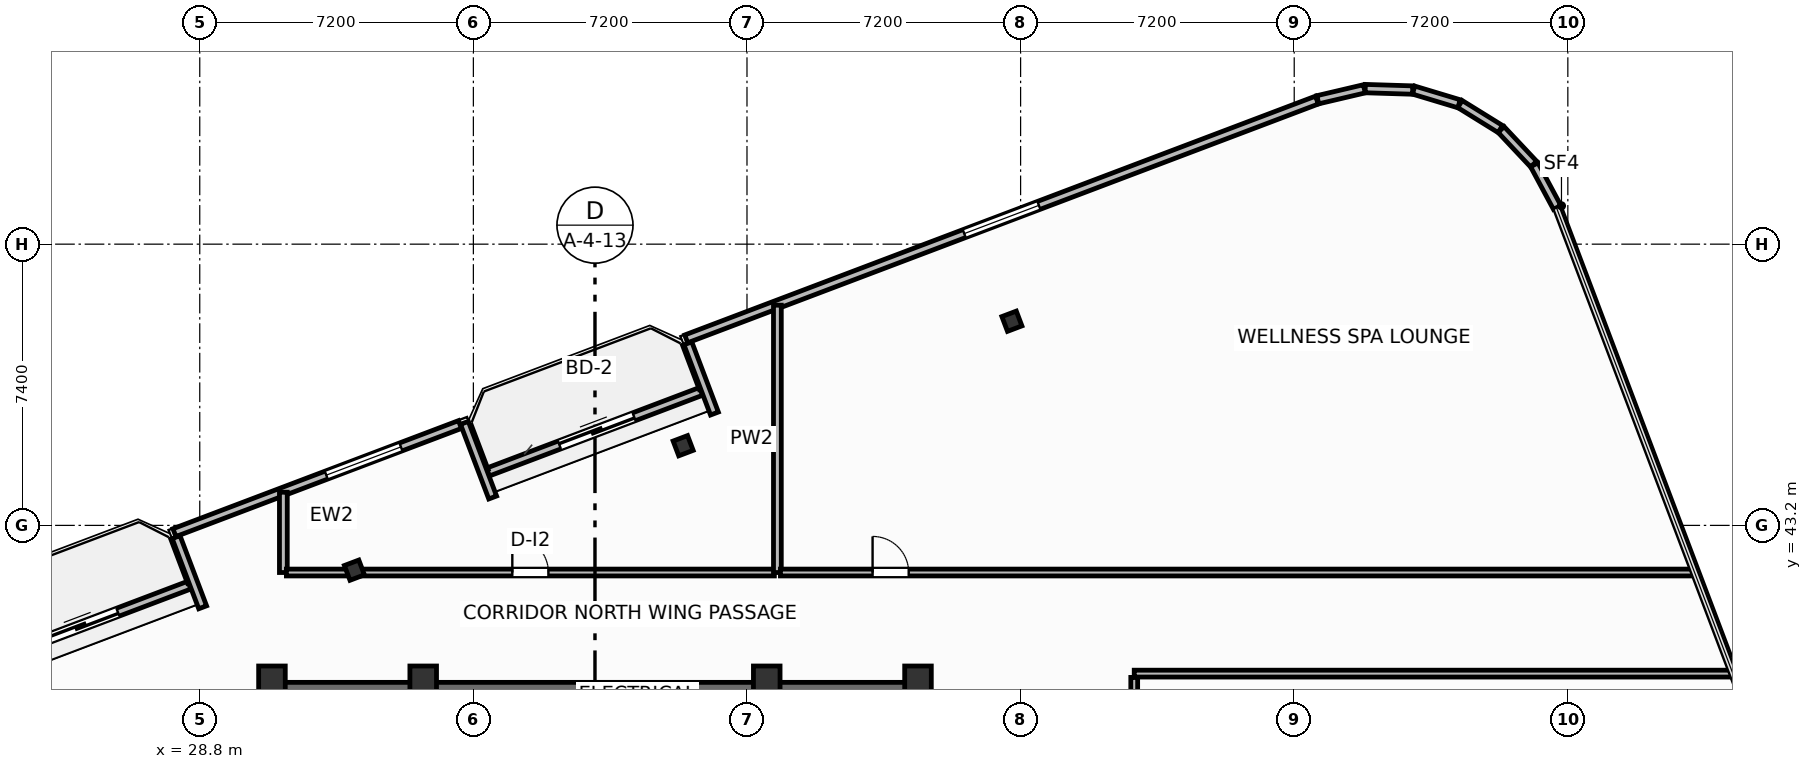
"""IFC4 building model, lengths in metres.
Left out: names, types, materials, properties, quantities, classifications, styles, units other than length and angle.
Written with IfcOpenShell. Run it as: python <this file> out.ifc"""

import sys

from ifc_helpers import new_model, si_unit, direction, frame, frame_2d, origin, origin_2d, place, context, subcontext, project, spatial, rectangle, i_section, extrude, element, fill, save


model = new_model("IFC4")
c1 = context("Model", 3, precision=1e-05, world=origin(), true_north=direction((0.0, 1.0)))
c2 = subcontext(c1, "Body", "Model", "MODEL_VIEW")
j1 = project(units=[si_unit("LENGTHUNIT", "METRE"), si_unit("PLANEANGLEUNIT", "RADIAN")], contexts=[c1])
p1 = place(None, origin())
s1 = spatial("IfcSite", under=j1, at=p1, CompositionType="ELEMENT")
p2 = place(p1, origin())
s2 = spatial("IfcBuilding", under=s1, at=p2, CompositionType="ELEMENT")
p3 = place(p2, frame((0.0, 0.0, 249.7)))
s3 = spatial("IfcBuildingStorey", under=s2, at=p3, CompositionType="ELEMENT", Elevation=249.7)
for number, where, z_axis, x_axis in (
    (1, (30.7, 39.05, 0.0), (0.0, 0.0, 1.0), (1.0, 0.0, 0.0)),
    (2, (34.68, 39.05, 0.0), (0.0, 0.0, 1.0), (1.0, 0.0, 0.0)),
    (3, (43.72, 39.05, 0.0), (0.0, 0.0, 1.0), (1.0, 0.0, 0.0)),
    (4, (47.7, 39.05, 0.0), (0.0, 0.0, 1.0), (1.0, 0.0, 0.0)),
):
    element("IfcColumn", number, at=place(p3, frame(where, z_axis=z_axis, x_axis=x_axis)), inside=s3, PredefinedType="COLUMN", context=c2, shape_type="SweptSolid", body=[
        extrude(rectangle(XDim=0.7, YDim=0.9, at=origin_2d()), origin(), (0.0, 0.0, 1.0), 3.7),
    ])
p4 = place(p3, frame((30.48, 38.745, 0.0), z_axis=(0.0, 0.0, 1.0), x_axis=(1.0, 0.0, 0.0)))
e5 = element("IfcWall", 5, at=p4, inside=s3, PredefinedType="SHEAR", context=c2, shape_type="SweptSolid", body=[
    extrude(rectangle(XDim=17.44, YDim=0.65, at=frame_2d((8.72, 0.0))), origin(), (0.0, 0.0, 1.0), 3.38),
])
for number, where, z_axis, x_axis in (
    (6, (50.171, 48.572, 0.0), (0.0, 0.0, 1.0), (0.935, 0.354, 0.0)),
    (7, (41.52, 45.297, 0.0), (0.0, 0.0, 1.0), (0.935, 0.354, 0.0)),
    (8, (32.869, 42.022, 0.0), (0.0, 0.0, 1.0), (0.935, 0.354, 0.0)),
):
    element("IfcColumn", number, at=place(p3, frame(where, z_axis=z_axis, x_axis=x_axis)), inside=s3, PredefinedType="COLUMN", context=c2, shape_type="SweptSolid", body=[
        extrude(i_section(OverallWidth=0.406, OverallDepth=0.416, WebThickness=0.03, FlangeThickness=0.048, FilletRadius=0.025, at=origin_2d()), origin(), (0.0, 0.0, 1.0), 3.7),
    ])
p5 = place(p3, frame((22.916, 39.504, 0.0), z_axis=(0.0, 0.0, 1.0), x_axis=(0.93521416643, 0.354082565101, 0.0)))
e9 = element("IfcWall", 9, at=p5, inside=s3, PredefinedType="SOLIDWALL", context=c2, shape_type="SweptSolid", body=[
    extrude(rectangle(XDim=6.0, YDim=0.22, at=frame_2d((3.0, 0.0))), origin(), (0.0, 0.0, 1.0), 2.66),
])
p6 = place(p5, frame((1.888, 0.0, 0.0)))
e10 = element("IfcOpeningElement", 10, at=p6, cuts=e9, PredefinedType="OPENING", context=c2, shape_type="SweptSolid", body=[
    extrude(rectangle(XDim=2.1, YDim=2.3, at=frame_2d((1.05, 1.15))), frame((0.0, 0.12, 0.0), z_axis=(0.0, -1.0, 0.0), x_axis=(1.0, 0.0, 0.0)), (0.0, 0.0, 1.0), 0.24),
])
p7 = place(p3, frame((36.383, 44.603, 0.0), z_axis=(0.0, 0.0, 1.0), x_axis=(0.935227640088, 0.354046976001, 0.0)))
e11 = element("IfcWall", 11, at=p7, inside=s3, PredefinedType="SOLIDWALL", context=c2, shape_type="SweptSolid", body=[
    extrude(rectangle(XDim=6.0, YDim=0.22, at=frame_2d((3.0, 0.0))), origin(), (0.0, 0.0, 1.0), 2.66),
])
p8 = place(p7, frame((2.012, 0.0, 0.0)))
e12 = element("IfcOpeningElement", 12, at=p8, cuts=e11, PredefinedType="OPENING", context=c2, shape_type="SweptSolid", body=[
    extrude(rectangle(XDim=2.1, YDim=2.3, at=frame_2d((1.05, 1.15))), frame((0.0, 0.12, 0.0), z_axis=(0.0, -1.0, 0.0), x_axis=(1.0, 0.0, 0.0)), (0.0, 0.0, 1.0), 0.24),
])
p9 = place(p3, frame((64.519, 51.566, 0.0), z_axis=(0.0, 0.0, 1.0), x_axis=(-0.473093575122, 0.881012184466, 0.0)))
e13 = element("IfcWall", 13, at=p9, inside=s3, PredefinedType="SOLIDWALL", context=c2, shape_type="SweptSolid", body=[
    extrude(rectangle(XDim=1.274, YDim=0.22, at=frame_2d((0.637, 0.0))), origin(), (0.0, 0.0, 1.0), 2.66),
])
for number, where, z_axis, x_axis in (
    (14, (63.899, 52.706, 0.0), (0.0, 0.0, 1.0), (-0.685, 0.729, 0.0)),
    (15, (63.023, 53.629, 0.0), (0.0, 0.0, 1.0), (-0.85, 0.526, 0.0)),
):
    element("IfcWall", number, at=place(p3, frame(where, z_axis=z_axis, x_axis=x_axis)), inside=s3, PredefinedType="SOLIDWALL", context=c2, shape_type="SweptSolid", body=[
        extrude(rectangle(XDim=1.249, YDim=0.22, at=frame_2d((0.625, 0.0))), origin(), (0.0, 0.0, 1.0), 2.66),
    ])
for number, where, z_axis, x_axis in (
    (16, (61.937, 54.294, 0.0), (0.0, 0.0, 1.0), (-0.958, 0.288, 0.0)),
    (17, (60.717, 54.655, 0.0), (0.0, 0.0, 1.0), (-1.0, 0.031, 0.0)),
):
    element("IfcWall", number, at=place(p3, frame(where, z_axis=z_axis, x_axis=x_axis)), inside=s3, PredefinedType="SOLIDWALL", context=c2, shape_type="SweptSolid", body=[
        extrude(rectangle(XDim=1.249, YDim=0.22, at=frame_2d((0.624, 0.0))), origin(), (0.0, 0.0, 1.0), 2.66),
    ])
p10 = place(p3, frame((59.444, 54.688, 0.0), z_axis=(0.0, 0.0, 1.0), x_axis=(-0.973409523464, -0.229071821989, 0.0)))
e18 = element("IfcWall", 18, at=p10, inside=s3, PredefinedType="SOLIDWALL", context=c2, shape_type="SweptSolid", body=[
    extrude(rectangle(XDim=1.257, YDim=0.22, at=frame_2d((0.628, 0.0))), origin(), (0.0, 0.0, 1.0), 2.66),
])
p11 = place(p3, frame((58.198, 54.391, 0.0), z_axis=(0.0, 0.0, 1.0), x_axis=(-0.935223849772, -0.354056988094, 0.0)))
e19 = element("IfcWall", 19, at=p11, inside=s3, PredefinedType="SOLIDWALL", context=c2, shape_type="SweptSolid", body=[
    extrude(rectangle(XDim=17.747, YDim=0.22, at=frame_2d((8.874, 0.0))), origin(), (0.0, 0.0, 1.0), 2.66),
])
p12 = place(p11, frame((7.823, 0.0, 0.8)))
e20 = element("IfcOpeningElement", 20, at=p12, cuts=e19, PredefinedType="OPENING", context=c2, shape_type="SweptSolid", body=[
    extrude(rectangle(XDim=2.1, YDim=1.75, at=frame_2d((1.05, 0.875))), frame((0.0, 0.12, 0.0), z_axis=(0.0, -1.0, 0.0), x_axis=(1.0, 0.0, 0.0)), (0.0, 0.0, 1.0), 0.24),
])
p13 = place(p3, frame((41.645, 47.99, 0.0), z_axis=(0.0, 0.0, 1.0), x_axis=(0.354020680661, -0.935237594232, 0.0)))
e21 = element("IfcWall", 21, at=p13, inside=s3, PredefinedType="SOLIDWALL", context=c2, shape_type="SweptSolid", body=[
    extrude(rectangle(XDim=1.975, YDim=0.22, at=frame_2d((0.988, 0.0))), origin(), (0.0, 0.0, 1.0), 2.66),
])
p14 = place(p3, frame((36.508, 43.934, 0.0), z_axis=(0.0, 0.0, 1.0), x_axis=(-0.354128469405, 0.935196785258, 0.0)))
e22 = element("IfcWall", 22, at=p14, inside=s3, PredefinedType="SOLIDWALL", context=c2, shape_type="SweptSolid", body=[
    extrude(rectangle(XDim=2.1, YDim=0.22, at=frame_2d((1.05, 0.0))), origin(), (0.0, 0.0, 1.0), 2.66),
])
p15 = place(p3, frame((35.648, 45.854, 0.0), z_axis=(0.0, 0.0, 1.0), x_axis=(-0.935230796934, -0.354038636968, 0.0)))
e23 = element("IfcWall", 23, at=p15, inside=s3, PredefinedType="SOLIDWALL", context=c2, shape_type="SweptSolid", body=[
    extrude(rectangle(XDim=8.035, YDim=0.22, at=frame_2d((4.018, 0.0))), origin(), (0.0, 0.0, 1.0), 2.66),
])
p16 = place(p15, frame((1.662, 0.0, 0.8)))
e24 = element("IfcOpeningElement", 24, at=p16, cuts=e23, PredefinedType="OPENING", context=c2, shape_type="SweptSolid", body=[
    extrude(rectangle(XDim=2.1, YDim=1.75, at=frame_2d((1.05, 0.875))), frame((0.0, 0.12, 0.0), z_axis=(0.0, -1.0, 0.0), x_axis=(1.0, 0.0, 0.0)), (0.0, 0.0, 1.0), 0.24),
])
p17 = place(p3, frame((28.177, 42.892, 0.0), z_axis=(0.0, 0.0, 1.0), x_axis=(0.354061611705, -0.935222099352, 0.0)))
e25 = element("IfcWall", 25, at=p17, inside=s3, PredefinedType="SOLIDWALL", context=c2, shape_type="SweptSolid", body=[
    extrude(rectangle(XDim=1.975, YDim=0.22, at=frame_2d((0.987, 0.0))), origin(), (0.0, 0.0, 1.0), 2.66),
])
p18 = place(p3, frame((31.0, 41.96, 0.0), z_axis=(0.0, 0.0, 1.0), x_axis=(0.0, 1.0, 0.0)))
e26 = element("IfcWall", 26, at=p18, inside=s3, PredefinedType="PARTITIONING", context=c2, shape_type="SweptSolid", body=[
    extrude(rectangle(XDim=2.113, YDim=0.205, at=frame_2d((1.056, 0.0))), origin(), (0.0, 0.0, 1.0), 3.38),
])
p19 = place(p3, frame((31.08, 41.96, 0.0), z_axis=(0.0, 0.0, 1.0), x_axis=(1.0, 0.0, 0.0)))
e27 = element("IfcWall", 27, at=p19, inside=s3, PredefinedType="PARTITIONING", context=c2, shape_type="SweptSolid", body=[
    extrude(rectangle(XDim=12.84, YDim=0.18, at=frame_2d((6.42, 0.0))), origin(), (0.0, 0.0, 1.0), 3.38),
])
p20 = place(p19, frame((5.945, 0.0, 0.0)))
e28 = element("IfcOpeningElement", 28, at=p20, cuts=e27, PredefinedType="OPENING", context=c2, shape_type="SweptSolid", body=[
    extrude(rectangle(XDim=0.95, YDim=2.05, at=frame_2d((0.475, 1.025))), frame((0.0, 0.1, 0.0), z_axis=(0.0, -1.0, 0.0), x_axis=(1.0, 0.0, 0.0)), (0.0, 0.0, 1.0), 0.2),
])
p21 = place(p3, frame((44.0, 41.96, 0.0), z_axis=(0.0, 0.0, 1.0), x_axis=(0.0, 1.0, 0.0)))
e29 = element("IfcWall", 29, at=p21, inside=s3, PredefinedType="PARTITIONING", context=c2, shape_type="SweptSolid", body=[
    extrude(rectangle(XDim=7.034, YDim=0.205, at=frame_2d((3.517, 0.0))), origin(), (0.0, 0.0, 1.0), 3.38),
])
p22 = place(p3, frame((44.08, 41.96, 0.0), z_axis=(0.0, 0.0, 1.0), x_axis=(1.0, 0.0, 0.0)))
e30 = element("IfcWall", 30, at=p22, inside=s3, PredefinedType="PARTITIONING", context=c2, shape_type="SweptSolid", body=[
    extrude(rectangle(XDim=24.016, YDim=0.18, at=frame_2d((12.008, 0.0))), origin(), (0.0, 0.0, 1.0), 3.38),
])
p23 = place(p22, frame((2.425, 0.0, 0.0)))
e31 = element("IfcOpeningElement", 31, at=p23, cuts=e30, PredefinedType="OPENING", context=c2, shape_type="SweptSolid", body=[
    extrude(rectangle(XDim=0.95, YDim=2.05, at=frame_2d((0.475, 1.025))), frame((0.0, 0.1, 0.0), z_axis=(0.0, -1.0, 0.0), x_axis=(1.0, 0.0, 0.0)), (0.0, 0.0, 1.0), 0.2),
])
p24 = place(p3, frame((53.39, 27.53, 0.0), z_axis=(0.0, 0.0, 1.0), x_axis=(0.0, 1.0, 0.0)))
e32 = element("IfcWall", 32, at=p24, inside=s3, PredefinedType="PARTITIONING", context=c2, shape_type="SweptSolid", body=[
    extrude(rectangle(XDim=11.67, YDim=0.18, at=frame_2d((5.835, 0.0))), origin(), (0.0, 0.0, 1.0), 3.38),
])
p25 = place(p24, frame((5.8, 0.0, 0.0)))
e33 = element("IfcOpeningElement", 33, at=p25, cuts=e32, PredefinedType="OPENING", context=c2, shape_type="SweptSolid", body=[
    extrude(rectangle(XDim=0.92, YDim=2.05, at=frame_2d((0.46, 1.025))), frame((0.0, 0.1, 0.0), z_axis=(0.0, -1.0, 0.0), x_axis=(1.0, 0.0, 0.0)), (0.0, 0.0, 1.0), 0.2),
])
p26 = place(p3, frame((53.39, 39.3, 0.0), z_axis=(0.0, 0.0, 1.0), x_axis=(1.0, 0.0, 0.0)))
e34 = element("IfcWall", 34, at=p26, inside=s3, PredefinedType="PARTITIONING", context=c2, shape_type="SweptSolid", body=[
    extrude(rectangle(XDim=15.713, YDim=0.18, at=frame_2d((7.856, 0.0))), origin(), (0.0, 0.0, 1.0), 3.38),
])
p27 = place(p6, origin())
e35 = element("IfcDoor", 35, at=p27, inside=s3, OperationType="SLIDING_TO_LEFT", PredefinedType="DOOR", context=c2, shape_type="SweptSolid", body=[
    extrude(rectangle(XDim=2.1, YDim=2.3, at=frame_2d((1.05, 1.15))), frame((0.0, 0.025, 0.0), z_axis=(0.0, -1.0, 0.0), x_axis=(1.0, 0.0, 0.0)), (0.0, 0.0, 1.0), 0.05),
])
fill(e10, e35)
p28 = place(p8, origin())
e36 = element("IfcDoor", 36, at=p28, inside=s3, OperationType="SLIDING_TO_LEFT", PredefinedType="DOOR", context=c2, shape_type="SweptSolid", body=[
    extrude(rectangle(XDim=2.1, YDim=2.3, at=frame_2d((1.05, 1.15))), frame((0.0, 0.025, 0.0), z_axis=(0.0, -1.0, 0.0), x_axis=(1.0, 0.0, 0.0)), (0.0, 0.0, 1.0), 0.05),
])
fill(e12, e36)
p29 = place(p12, origin())
e37 = element("IfcWindow", 37, at=p29, inside=s3, PartitioningType="SINGLE_PANEL", PredefinedType="WINDOW", context=c2, shape_type="SweptSolid", body=[
    extrude(rectangle(XDim=2.1, YDim=1.75, at=frame_2d((1.05, 0.875))), frame((0.0, 0.03, 0.0), z_axis=(0.0, -1.0, 0.0), x_axis=(1.0, 0.0, 0.0)), (0.0, 0.0, 1.0), 0.06),
])
fill(e20, e37)
p30 = place(p16, origin())
e38 = element("IfcWindow", 38, at=p30, inside=s3, PartitioningType="SINGLE_PANEL", PredefinedType="WINDOW", context=c2, shape_type="SweptSolid", body=[
    extrude(rectangle(XDim=2.1, YDim=1.75, at=frame_2d((1.05, 0.875))), frame((0.0, 0.03, 0.0), z_axis=(0.0, -1.0, 0.0), x_axis=(1.0, 0.0, 0.0)), (0.0, 0.0, 1.0), 0.06),
])
fill(e24, e38)
p31 = place(p20, origin())
e39 = element("IfcDoor", 39, at=p31, inside=s3, OperationType="SINGLE_SWING_LEFT", PredefinedType="DOOR", context=c2, shape_type="SweptSolid", body=[
    extrude(rectangle(XDim=0.95, YDim=2.05, at=frame_2d((0.475, 1.025))), frame((0.0, 0.025, 0.0), z_axis=(0.0, -1.0, 0.0), x_axis=(1.0, 0.0, 0.0)), (0.0, 0.0, 1.0), 0.05),
])
fill(e28, e39)
p32 = place(p23, origin())
e40 = element("IfcDoor", 40, at=p32, inside=s3, OperationType="SINGLE_SWING_LEFT", PredefinedType="DOOR", context=c2, shape_type="SweptSolid", body=[
    extrude(rectangle(XDim=0.95, YDim=2.05, at=frame_2d((0.475, 1.025))), frame((0.0, 0.025, 0.0), z_axis=(0.0, -1.0, 0.0), x_axis=(1.0, 0.0, 0.0)), (0.0, 0.0, 1.0), 0.05),
])
fill(e31, e40)
save(model, sys.argv[1])
